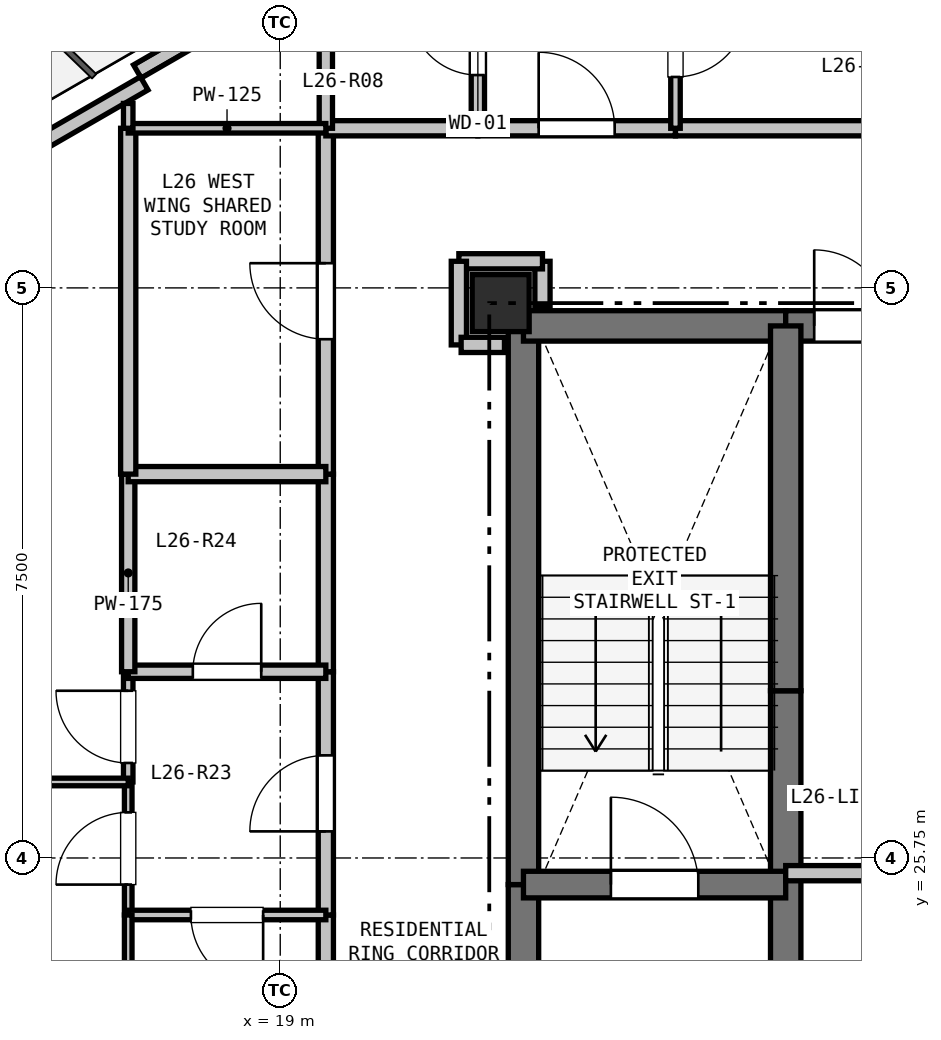
"""IFC4 building model, lengths in metres.
Left out: names, types, materials, properties, quantities, classifications, styles, units other than length and angle.
Written with IfcOpenShell. Run it as: python <this file> out.ifc"""

import sys

from ifc_helpers import new_model, si_unit, direction, frame, frame_2d, origin, origin_2d, place, context, subcontext, project, spatial, rectangle, extrude, element, fill, save


model = new_model("IFC4")
c1 = context("Model", 3, precision=1e-05, world=origin(), true_north=direction((0.0, 1.0)))
c2 = subcontext(c1, "Body", "Model", "MODEL_VIEW")
j1 = project(units=[si_unit("LENGTHUNIT", "METRE"), si_unit("PLANEANGLEUNIT", "RADIAN")], contexts=[c1])
p1 = place(None, origin())
s1 = spatial("IfcSite", under=j1, at=p1, CompositionType="ELEMENT")
p2 = place(p1, origin())
s2 = spatial("IfcBuilding", under=s1, at=p2, CompositionType="ELEMENT")
p3 = place(p2, frame((0.0, 0.0, 96.6)))
s3 = spatial("IfcBuildingStorey", under=s2, at=p3, CompositionType="ELEMENT", Elevation=96.6)
p4 = place(p3, frame((21.9, 33.05, 0.0), z_axis=(0.0, 0.0, 1.0), x_axis=(1.0, 0.0, 0.0)))
e1 = element("IfcColumn", 1, at=p4, inside=s3, PredefinedType="COLUMN", context=c2, shape_type="SweptSolid", body=[
    extrude(rectangle(XDim=0.75, YDim=0.75, at=origin_2d()), origin(), (0.0, 0.0, 1.0), 3.3),
])
p5 = place(p3, frame((17.12, 36.097, 0.0), z_axis=(0.0, 0.0, 1.0), x_axis=(0.866027010039, 0.499997217876, 0.0)))
e2 = element("IfcWall", 2, at=p5, inside=s3, PredefinedType="PARAPET", context=c2, shape_type="SweptSolid", body=[
    extrude(rectangle(XDim=11.229, YDim=0.2, at=frame_2d((5.615, 0.0))), origin(), (0.0, 0.0, 1.0), 0.2),
])
p6 = place(p3, frame((15.738, 35.091, 0.0), z_axis=(0.0, 0.0, 1.0), x_axis=(0.866025371046, 0.500000056704, 0.0)))
e3 = element("IfcWall", 3, at=p6, inside=s3, PredefinedType="PARAPET", context=c2, shape_type="SweptSolid", body=[
    extrude(rectangle(XDim=1.7, YDim=0.2, at=frame_2d((0.85, 0.0))), origin(), (0.0, 0.0, 1.0), 2.67),
])
p7 = place(p3, frame((22.2, 20.75, 0.0), z_axis=(0.0, 0.0, 1.0), x_axis=(0.0, 1.0, 0.0)))
e4 = element("IfcWall", 4, at=p7, inside=s3, PredefinedType="SHEAR", context=c2, shape_type="SweptSolid", body=[
    extrude(rectangle(XDim=4.65, YDim=0.4, at=frame_2d((2.325, 0.0))), origin(), (0.0, 0.0, 1.0), 3.05),
])
p8 = place(p3, frame((22.2, 25.4, 0.0), z_axis=(0.0, 0.0, 1.0), x_axis=(0.0, 1.0, 0.0)))
e5 = element("IfcWall", 5, at=p8, inside=s3, PredefinedType="SHEAR", context=c2, shape_type="SweptSolid", body=[
    extrude(rectangle(XDim=7.35, YDim=0.4, at=frame_2d((3.675, 0.0))), origin(), (0.0, 0.0, 1.0), 3.05),
])
p9 = place(p3, frame((22.2, 32.75, 0.0), z_axis=(0.0, 0.0, 1.0), x_axis=(1.0, 0.0, 0.0)))
e6 = element("IfcWall", 6, at=p9, inside=s3, PredefinedType="SHEAR", context=c2, shape_type="SweptSolid", body=[
    extrude(rectangle(XDim=3.45, YDim=0.4, at=frame_2d((1.725, 0.0))), origin(), (0.0, 0.0, 1.0), 3.05),
])
p10 = place(p3, frame((25.65, 32.75, 0.0), z_axis=(0.0, 0.0, 1.0), x_axis=(1.0, 0.0, 0.0)))
e7 = element("IfcWall", 7, at=p10, inside=s3, PredefinedType="SHEAR", context=c2, shape_type="SweptSolid", body=[
    extrude(rectangle(XDim=1.75, YDim=0.4, at=frame_2d((0.875, 0.0))), origin(), (0.0, 0.0, 1.0), 3.05),
])
p11 = place(p10, frame((0.375, 0.0, 0.0)))
e8 = element("IfcOpeningElement", 8, at=p11, cuts=e7, PredefinedType="OPENING", context=c2, shape_type="SweptSolid", body=[
    extrude(rectangle(XDim=1.0, YDim=2.15, at=frame_2d((0.5, 1.075))), frame((0.0, 0.21, 0.0), z_axis=(0.0, -1.0, 0.0), x_axis=(1.0, 0.0, 0.0)), (0.0, 0.0, 1.0), 0.42),
])
p12 = place(p3, frame((25.65, 22.75, 0.0), z_axis=(0.0, 0.0, 1.0), x_axis=(0.0, 1.0, 0.0)))
e9 = element("IfcWall", 9, at=p12, inside=s3, PredefinedType="SHEAR", context=c2, shape_type="SweptSolid", body=[
    extrude(rectangle(XDim=2.8, YDim=0.4, at=frame_2d((1.4, 0.0))), origin(), (0.0, 0.0, 1.0), 3.05),
])
p13 = place(p3, frame((25.65, 25.55, 0.0), z_axis=(0.0, 0.0, 1.0), x_axis=(0.0, 1.0, 0.0)))
e10 = element("IfcWall", 10, at=p13, inside=s3, PredefinedType="SHEAR", context=c2, shape_type="SweptSolid", body=[
    extrude(rectangle(XDim=2.4, YDim=0.4, at=frame_2d((1.2, 0.0))), origin(), (0.0, 0.0, 1.0), 3.05),
])
p14 = place(p3, frame((25.65, 27.95, 0.0), z_axis=(0.0, 0.0, 1.0), x_axis=(0.0, 1.0, 0.0)))
e11 = element("IfcWall", 11, at=p14, inside=s3, PredefinedType="SHEAR", context=c2, shape_type="SweptSolid", body=[
    extrude(rectangle(XDim=4.8, YDim=0.4, at=frame_2d((2.4, 0.0))), origin(), (0.0, 0.0, 1.0), 3.05),
])
p15 = place(p3, frame((22.2, 25.4, 0.0), z_axis=(0.0, 0.0, 1.0), x_axis=(1.0, 0.0, 0.0)))
e12 = element("IfcWall", 12, at=p15, inside=s3, PredefinedType="SHEAR", context=c2, shape_type="SweptSolid", body=[
    extrude(rectangle(XDim=3.45, YDim=0.35, at=frame_2d((1.725, 0.0))), origin(), (0.0, 0.0, 1.0), 3.05),
])
p16 = place(p15, frame((1.15, 0.0, 0.0)))
e13 = element("IfcOpeningElement", 13, at=p16, cuts=e12, PredefinedType="OPENING", context=c2, shape_type="SweptSolid", body=[
    extrude(rectangle(XDim=1.15, YDim=2.15, at=frame_2d((0.575, 1.075))), frame((0.0, 0.185, 0.0), z_axis=(0.0, -1.0, 0.0), x_axis=(1.0, 0.0, 0.0)), (0.0, 0.0, 1.0), 0.37),
])
p17 = place(p3, frame((25.65, 25.55, 0.0), z_axis=(0.0, 0.0, 1.0), x_axis=(1.0, 0.0, 0.0)))
e14 = element("IfcWall", 14, at=p17, inside=s3, PredefinedType="PARTITIONING", context=c2, shape_type="SweptSolid", body=[
    extrude(rectangle(XDim=4.95, YDim=0.2, at=frame_2d((2.475, 0.0))), origin(), (0.0, 0.0, 1.0), 3.05),
])
p18 = place(p3, frame((19.6, 21.8, 0.0), z_axis=(0.0, 0.0, 1.0), x_axis=(0.0, 1.0, 0.0)))
e15 = element("IfcWall", 15, at=p18, inside=s3, PredefinedType="PARTITIONING", context=c2, shape_type="SweptSolid", body=[
    extrude(rectangle(XDim=3.2, YDim=0.2, at=frame_2d((1.6, 0.0))), origin(), (0.0, 0.0, 1.0), 3.05),
])
p19 = place(p3, frame((19.6, 25.0, 0.0), z_axis=(0.0, 0.0, 1.0), x_axis=(0.0, 1.0, 0.0)))
e16 = element("IfcWall", 16, at=p19, inside=s3, PredefinedType="PARTITIONING", context=c2, shape_type="SweptSolid", body=[
    extrude(rectangle(XDim=3.2, YDim=0.2, at=frame_2d((1.6, 0.0))), origin(), (0.0, 0.0, 1.0), 3.05),
])
p20 = place(p19, frame((1.1, 0.0, 0.0)))
e17 = element("IfcOpeningElement", 17, at=p20, cuts=e16, PredefinedType="OPENING", context=c2, shape_type="SweptSolid", body=[
    extrude(rectangle(XDim=1.0, YDim=2.15, at=frame_2d((0.5, 1.075))), frame((0.0, 0.11, 0.0), z_axis=(0.0, -1.0, 0.0), x_axis=(1.0, 0.0, 0.0)), (0.0, 0.0, 1.0), 0.22),
])
p21 = place(p3, frame((19.6, 28.2, 0.0), z_axis=(0.0, 0.0, 1.0), x_axis=(0.0, 1.0, 0.0)))
e18 = element("IfcWall", 18, at=p21, inside=s3, PredefinedType="PARTITIONING", context=c2, shape_type="SweptSolid", body=[
    extrude(rectangle(XDim=2.6, YDim=0.2, at=frame_2d((1.3, 0.0))), origin(), (0.0, 0.0, 1.0), 3.05),
])
p22 = place(p3, frame((19.6, 30.8, 0.0), z_axis=(0.0, 0.0, 1.0), x_axis=(0.0, 1.0, 0.0)))
e19 = element("IfcWall", 19, at=p22, inside=s3, PredefinedType="PARTITIONING", context=c2, shape_type="SweptSolid", body=[
    extrude(rectangle(XDim=4.55, YDim=0.2, at=frame_2d((2.275, 0.0))), origin(), (0.0, 0.0, 1.0), 2.423),
])
p23 = place(p22, frame((1.775, 0.0, 0.0)))
e20 = element("IfcOpeningElement", 20, at=p23, cuts=e19, PredefinedType="OPENING", context=c2, shape_type="SweptSolid", body=[
    extrude(rectangle(XDim=1.0, YDim=2.15, at=frame_2d((0.5, 1.075))), frame((0.0, 0.11, 0.0), z_axis=(0.0, -1.0, 0.0), x_axis=(1.0, 0.0, 0.0)), (0.0, 0.0, 1.0), 0.22),
])
p24 = place(p3, frame((19.6, 35.35, 0.0), z_axis=(0.0, 0.0, 1.0), x_axis=(1.0, 0.0, 0.0)))
e21 = element("IfcWall", 21, at=p24, inside=s3, PredefinedType="PARTITIONING", context=c2, shape_type="SweptSolid", body=[
    extrude(rectangle(XDim=2.0, YDim=0.2, at=frame_2d((1.0, 0.0))), origin(), (0.0, 0.0, 1.0), 3.05),
])
p25 = place(p3, frame((21.6, 35.35, 0.0), z_axis=(0.0, 0.0, 1.0), x_axis=(1.0, 0.0, 0.0)))
e22 = element("IfcWall", 22, at=p25, inside=s3, PredefinedType="PARTITIONING", context=c2, shape_type="SweptSolid", body=[
    extrude(rectangle(XDim=2.6, YDim=0.2, at=frame_2d((1.3, 0.0))), origin(), (0.0, 0.0, 1.0), 3.05),
])
p26 = place(p25, frame((0.8, 0.0, 0.0)))
e23 = element("IfcOpeningElement", 23, at=p26, cuts=e22, PredefinedType="OPENING", context=c2, shape_type="SweptSolid", body=[
    extrude(rectangle(XDim=1.0, YDim=2.15, at=frame_2d((0.5, 1.075))), frame((0.0, 0.11, 0.0), z_axis=(0.0, -1.0, 0.0), x_axis=(1.0, 0.0, 0.0)), (0.0, 0.0, 1.0), 0.22),
])
p27 = place(p3, frame((24.2, 35.35, 0.0), z_axis=(0.0, 0.0, 1.0), x_axis=(1.0, 0.0, 0.0)))
e24 = element("IfcWall", 24, at=p27, inside=s3, PredefinedType="PARTITIONING", context=c2, shape_type="SweptSolid", body=[
    extrude(rectangle(XDim=3.2, YDim=0.2, at=frame_2d((1.6, 0.0))), origin(), (0.0, 0.0, 1.0), 3.05),
])
p28 = place(p3, frame((22.45, 33.0, 0.0), z_axis=(0.0, 0.0, 1.0), x_axis=(0.0, 1.0, 0.0)))
e25 = element("IfcWall", 25, at=p28, inside=s3, PredefinedType="PARTITIONING", context=c2, shape_type="SweptSolid", body=[
    extrude(rectangle(XDim=0.6, YDim=0.2, at=frame_2d((0.3, 0.0))), origin(), (0.0, 0.0, 1.0), 2.498),
])
p29 = place(p3, frame((22.45, 33.6, 0.0), z_axis=(0.0, 0.0, 1.0), x_axis=(-1.0, 0.0, 0.0)))
e26 = element("IfcWall", 26, at=p29, inside=s3, PredefinedType="PARTITIONING", context=c2, shape_type="SweptSolid", body=[
    extrude(rectangle(XDim=1.1, YDim=0.2, at=frame_2d((0.55, 0.0))), origin(), (0.0, 0.0, 1.0), 3.05),
])
p30 = place(p3, frame((21.35, 33.6, 0.0), z_axis=(0.0, 0.0, 1.0), x_axis=(0.0, -1.0, 0.0)))
e27 = element("IfcWall", 27, at=p30, inside=s3, PredefinedType="PARTITIONING", context=c2, shape_type="SweptSolid", body=[
    extrude(rectangle(XDim=1.1, YDim=0.2, at=frame_2d((0.55, 0.0))), origin(), (0.0, 0.0, 1.0), 2.423),
])
p31 = place(p3, frame((21.38, 32.5, 0.0), z_axis=(0.0, 0.0, 1.0), x_axis=(1.0, 0.0, 0.0)))
e28 = element("IfcWall", 28, at=p31, inside=s3, PredefinedType="PARTITIONING", context=c2, shape_type="SweptSolid", body=[
    extrude(rectangle(XDim=0.57, YDim=0.2, at=frame_2d((0.285, 0.0))), origin(), (0.0, 0.0, 1.0), 2.498),
])
p32 = place(p3, frame((24.2, 37.65, 0.0), z_axis=(0.0, 0.0, 1.0), x_axis=(0.0, -1.0, 0.0)))
e29 = element("IfcWall", 29, at=p32, inside=s3, PredefinedType="PARTITIONING", context=c2, shape_type="SweptSolid", body=[
    extrude(rectangle(XDim=2.3, YDim=0.125, at=frame_2d((1.15, 0.0))), origin(), (0.0, 0.0, 1.0), 3.05),
])
p33 = place(p32, frame((0.675, 0.0, 0.0)))
e30 = element("IfcOpeningElement", 30, at=p33, cuts=e29, PredefinedType="OPENING", context=c2, shape_type="SweptSolid", body=[
    extrude(rectangle(XDim=0.95, YDim=2.1, at=frame_2d((0.475, 1.05))), frame((0.0, 0.073, 0.0), z_axis=(0.0, -1.0, 0.0), x_axis=(1.0, 0.0, 0.0)), (0.0, 0.0, 1.0), 0.145),
])
p34 = place(p3, frame((21.6, 35.35, 0.0), z_axis=(0.0, 0.0, 1.0), x_axis=(0.0, 1.0, 0.0)))
e31 = element("IfcWall", 31, at=p34, inside=s3, PredefinedType="PLUMBINGWALL", context=c2, shape_type="SweptSolid", body=[
    extrude(rectangle(XDim=2.3, YDim=0.175, at=frame_2d((1.15, 0.0))), origin(), (0.0, 0.0, 1.0), 3.05),
])
p35 = place(p34, frame((0.7, 0.0, 0.0)))
e32 = element("IfcOpeningElement", 32, at=p35, cuts=e31, PredefinedType="OPENING", context=c2, shape_type="SweptSolid", body=[
    extrude(rectangle(XDim=0.9, YDim=2.1, at=frame_2d((0.45, 1.05))), frame((0.0, 0.097, 0.0), z_axis=(0.0, -1.0, 0.0), x_axis=(1.0, 0.0, 0.0)), (0.0, 0.0, 1.0), 0.195),
])
p36 = place(p3, frame((17.0, 25.0, 0.0), z_axis=(0.0, 0.0, 1.0), x_axis=(0.0, 1.0, 0.0)))
e33 = element("IfcWall", 33, at=p36, inside=s3, PredefinedType="PARTITIONING", context=c2, shape_type="SweptSolid", body=[
    extrude(rectangle(XDim=1.75, YDim=0.1, at=frame_2d((0.875, 0.0))), origin(), (0.0, 0.0, 1.0), 3.05),
])
p37 = place(p36, frame((0.4, 0.0, 0.0)))
e34 = element("IfcOpeningElement", 34, at=p37, cuts=e33, PredefinedType="OPENING", context=c2, shape_type="SweptSolid", body=[
    extrude(rectangle(XDim=0.95, YDim=2.1, at=frame_2d((0.475, 1.05))), frame((0.0, 0.06, 0.0), z_axis=(0.0, -1.0, 0.0), x_axis=(1.0, 0.0, 0.0)), (0.0, 0.0, 1.0), 0.12),
])
p38 = place(p3, frame((17.0, 26.75, 0.0), z_axis=(0.0, 0.0, 1.0), x_axis=(0.0, 1.0, 0.0)))
e35 = element("IfcWall", 35, at=p38, inside=s3, PredefinedType="PARTITIONING", context=c2, shape_type="SweptSolid", body=[
    extrude(rectangle(XDim=1.45, YDim=0.125, at=frame_2d((0.725, 0.0))), origin(), (0.0, 0.0, 1.0), 3.05),
])
p39 = place(p38, frame((0.25, 0.0, 0.0)))
e36 = element("IfcOpeningElement", 36, at=p39, cuts=e35, PredefinedType="OPENING", context=c2, shape_type="SweptSolid", body=[
    extrude(rectangle(XDim=0.95, YDim=2.1, at=frame_2d((0.475, 1.05))), frame((0.0, 0.073, 0.0), z_axis=(0.0, -1.0, 0.0), x_axis=(1.0, 0.0, 0.0)), (0.0, 0.0, 1.0), 0.145),
])
p40 = place(p3, frame((17.0, 28.2, 0.0), z_axis=(0.0, 0.0, 1.0), x_axis=(1.0, 0.0, 0.0)))
e37 = element("IfcWall", 37, at=p40, inside=s3, PredefinedType="PLUMBINGWALL", context=c2, shape_type="SweptSolid", body=[
    extrude(rectangle(XDim=2.6, YDim=0.175, at=frame_2d((1.3, 0.0))), origin(), (0.0, 0.0, 1.0), 3.05),
])
p41 = place(p40, frame((0.85, 0.0, 0.0)))
e38 = element("IfcOpeningElement", 38, at=p41, cuts=e37, PredefinedType="OPENING", context=c2, shape_type="SweptSolid", body=[
    extrude(rectangle(XDim=0.9, YDim=2.1, at=frame_2d((0.45, 1.05))), frame((0.0, 0.097, 0.0), z_axis=(0.0, -1.0, 0.0), x_axis=(1.0, 0.0, 0.0)), (0.0, 0.0, 1.0), 0.195),
])
p42 = place(p3, frame((19.6, 25.0, 0.0), z_axis=(0.0, 0.0, 1.0), x_axis=(-1.0, 0.0, 0.0)))
e39 = element("IfcWall", 39, at=p42, inside=s3, PredefinedType="PARTITIONING", context=c2, shape_type="SweptSolid", body=[
    extrude(rectangle(XDim=2.6, YDim=0.125, at=frame_2d((1.3, 0.0))), origin(), (0.0, 0.0, 1.0), 3.05),
])
p43 = place(p42, frame((0.825, 0.0, 0.0)))
e40 = element("IfcOpeningElement", 40, at=p43, cuts=e39, PredefinedType="OPENING", context=c2, shape_type="SweptSolid", body=[
    extrude(rectangle(XDim=0.95, YDim=2.1, at=frame_2d((0.475, 1.05))), frame((0.0, 0.073, 0.0), z_axis=(0.0, -1.0, 0.0), x_axis=(1.0, 0.0, 0.0)), (0.0, 0.0, 1.0), 0.145),
])
p44 = place(p3, frame((19.6, 35.35, 0.0), z_axis=(0.0, 0.0, 1.0), x_axis=(0.0, 1.0, 0.0)))
e41 = element("IfcWall", 41, at=p44, inside=s3, PredefinedType="PLUMBINGWALL", context=c2, shape_type="SweptSolid", body=[
    extrude(rectangle(XDim=2.137, YDim=0.175, at=frame_2d((1.068, 0.0))), origin(), (0.0, 0.0, 1.0), 2.365),
])
p45 = place(p3, frame((17.0, 28.2, 0.0), z_axis=(0.0, 0.0, 1.0), x_axis=(0.0, 1.0, 0.0)))
e42 = element("IfcWall", 42, at=p45, inside=s3, PredefinedType="PLUMBINGWALL", context=c2, shape_type="SweptSolid", body=[
    extrude(rectangle(XDim=2.6, YDim=0.175, at=frame_2d((1.3, 0.0))), origin(), (0.0, 0.0, 1.0), 3.05),
])
p46 = place(p3, frame((17.0, 30.8, 0.0), z_axis=(0.0, 0.0, 1.0), x_axis=(1.0, 0.0, 0.0)))
e43 = element("IfcWall", 43, at=p46, inside=s3, PredefinedType="PARTITIONING", context=c2, shape_type="SweptSolid", body=[
    extrude(rectangle(XDim=2.6, YDim=0.2, at=frame_2d((1.3, 0.0))), origin(), (0.0, 0.0, 1.0), 3.05),
])
p47 = place(p3, frame((17.0, 21.8, 0.0), z_axis=(0.0, 0.0, 1.0), x_axis=(0.0, 1.0, 0.0)))
e44 = element("IfcWall", 44, at=p47, inside=s3, PredefinedType="PARTITIONING", context=c2, shape_type="SweptSolid", body=[
    extrude(rectangle(XDim=3.2, YDim=0.1, at=frame_2d((1.6, 0.0))), origin(), (0.0, 0.0, 1.0), 2.423),
])
p48 = place(p47, frame((1.125, 0.0, 0.0)))
e45 = element("IfcOpeningElement", 45, at=p48, cuts=e44, PredefinedType="OPENING", context=c2, shape_type="SweptSolid", body=[
    extrude(rectangle(XDim=0.95, YDim=2.1, at=frame_2d((0.475, 1.05))), frame((0.0, 0.06, 0.0), z_axis=(0.0, -1.0, 0.0), x_axis=(1.0, 0.0, 0.0)), (0.0, 0.0, 1.0), 0.12),
])
p49 = place(p3, frame((17.0, 30.8, 0.0), z_axis=(0.0, 0.0, 1.0), x_axis=(0.0, 1.0, 0.0)))
e46 = element("IfcWall", 46, at=p49, inside=s3, PredefinedType="PARTITIONING", context=c2, shape_type="SweptSolid", body=[
    extrude(rectangle(XDim=4.55, YDim=0.2, at=frame_2d((2.275, 0.0))), origin(), (0.0, 0.0, 1.0), 2.365),
])
p50 = place(p3, frame((17.0, 35.35, 0.0), z_axis=(0.0, 0.0, 1.0), x_axis=(1.0, 0.0, 0.0)))
e47 = element("IfcWall", 47, at=p50, inside=s3, PredefinedType="PARTITIONING", context=c2, shape_type="SweptSolid", body=[
    extrude(rectangle(XDim=2.6, YDim=0.125, at=frame_2d((1.3, 0.0))), origin(), (0.0, 0.0, 1.0), 2.365),
])
p51 = place(p3, frame((17.0, 35.677, 0.0), z_axis=(0.0, 0.0, 1.0), x_axis=(0.0, -1.0, 0.0)))
e48 = element("IfcWall", 48, at=p51, inside=s3, PredefinedType="PARTITIONING", context=c2, shape_type="SweptSolid", body=[
    extrude(rectangle(XDim=0.326, YDim=0.125, at=frame_2d((0.163, 0.0))), origin(), (0.0, 0.0, 1.0), 2.365),
])
p52 = place(p3, frame((17.0, 26.75, 0.0), z_axis=(0.0, 0.0, 1.0), x_axis=(-1.0, 0.0, 0.0)))
e49 = element("IfcWall", 49, at=p52, inside=s3, PredefinedType="PARTITIONING", context=c2, shape_type="SweptSolid", body=[
    extrude(rectangle(XDim=5.91, YDim=0.1, at=frame_2d((2.955, 0.0))), origin(), (0.0, 0.0, 1.0), 3.05),
])
p53 = place(p52, frame((2.48, 0.0, 0.0)))
e50 = element("IfcOpeningElement", 50, at=p53, cuts=e49, PredefinedType="OPENING", context=c2, shape_type="SweptSolid", body=[
    extrude(rectangle(XDim=0.95, YDim=2.1, at=frame_2d((0.475, 1.05))), frame((0.0, 0.06, 0.0), z_axis=(0.0, -1.0, 0.0), x_axis=(1.0, 0.0, 0.0)), (0.0, 0.0, 1.0), 0.12),
])
p54 = place(p11, origin())
e51 = element("IfcDoor", 51, at=p54, inside=s3, OperationType="SINGLE_SWING_LEFT", PredefinedType="DOOR", context=c2, shape_type="SweptSolid", body=[
    extrude(rectangle(XDim=1.0, YDim=2.15, at=frame_2d((0.5, 1.075))), frame((0.0, 0.025, 0.0), z_axis=(0.0, -1.0, 0.0), x_axis=(1.0, 0.0, 0.0)), (0.0, 0.0, 1.0), 0.05),
])
fill(e8, e51)
p55 = place(p16, origin())
e52 = element("IfcDoor", 52, at=p55, inside=s3, OperationType="SINGLE_SWING_LEFT", PredefinedType="DOOR", context=c2, shape_type="SweptSolid", body=[
    extrude(rectangle(XDim=1.15, YDim=2.15, at=frame_2d((0.575, 1.075))), frame((0.0, 0.025, 0.0), z_axis=(0.0, -1.0, 0.0), x_axis=(1.0, 0.0, 0.0)), (0.0, 0.0, 1.0), 0.05),
])
fill(e13, e52)
p56 = place(p26, origin())
e53 = element("IfcDoor", 53, at=p56, inside=s3, OperationType="SINGLE_SWING_LEFT", PredefinedType="DOOR", context=c2, shape_type="SweptSolid", body=[
    extrude(rectangle(XDim=1.0, YDim=2.15, at=frame_2d((0.5, 1.075))), frame((0.0, 0.025, 0.0), z_axis=(0.0, -1.0, 0.0), x_axis=(1.0, 0.0, 0.0)), (0.0, 0.0, 1.0), 0.05),
])
fill(e23, e53)
p57 = place(p20, origin())
e54 = element("IfcDoor", 54, at=p57, inside=s3, OperationType="SINGLE_SWING_LEFT", PredefinedType="DOOR", context=c2, shape_type="SweptSolid", body=[
    extrude(rectangle(XDim=1.0, YDim=2.15, at=frame_2d((0.5, 1.075))), frame((0.0, 0.025, 0.0), z_axis=(0.0, -1.0, 0.0), x_axis=(1.0, 0.0, 0.0)), (0.0, 0.0, 1.0), 0.05),
])
fill(e17, e54)
p58 = place(p23, origin())
e55 = element("IfcDoor", 55, at=p58, inside=s3, OperationType="SINGLE_SWING_RIGHT", PredefinedType="DOOR", context=c2, shape_type="SweptSolid", body=[
    extrude(rectangle(XDim=1.0, YDim=2.15, at=frame_2d((0.5, 1.075))), frame((0.0, 0.025, 0.0), z_axis=(0.0, -1.0, 0.0), x_axis=(1.0, 0.0, 0.0)), (0.0, 0.0, 1.0), 0.05),
])
fill(e20, e55)
p59 = place(p35, origin())
e56 = element("IfcDoor", 56, at=p59, inside=s3, OperationType="SINGLE_SWING_RIGHT", PredefinedType="DOOR", context=c2, shape_type="SweptSolid", body=[
    extrude(rectangle(XDim=0.9, YDim=2.1, at=frame_2d((0.45, 1.05))), frame((0.0, 0.025, 0.0), z_axis=(0.0, -1.0, 0.0), x_axis=(1.0, 0.0, 0.0)), (0.0, 0.0, 1.0), 0.05),
])
fill(e32, e56)
p60 = place(p33, origin())
e57 = element("IfcDoor", 57, at=p60, inside=s3, OperationType="SINGLE_SWING_LEFT", PredefinedType="DOOR", context=c2, shape_type="SweptSolid", body=[
    extrude(rectangle(XDim=0.95, YDim=2.1, at=frame_2d((0.475, 1.05))), frame((0.0, 0.025, 0.0), z_axis=(0.0, -1.0, 0.0), x_axis=(1.0, 0.0, 0.0)), (0.0, 0.0, 1.0), 0.05),
])
fill(e30, e57)
p61 = place(p41, origin())
e58 = element("IfcDoor", 58, at=p61, inside=s3, OperationType="SINGLE_SWING_RIGHT", PredefinedType="DOOR", context=c2, shape_type="SweptSolid", body=[
    extrude(rectangle(XDim=0.9, YDim=2.1, at=frame_2d((0.45, 1.05))), frame((0.0, 0.025, 0.0), z_axis=(0.0, -1.0, 0.0), x_axis=(1.0, 0.0, 0.0)), (0.0, 0.0, 1.0), 0.05),
])
fill(e38, e58)
p62 = place(p43, origin())
e59 = element("IfcDoor", 59, at=p62, inside=s3, OperationType="SINGLE_SWING_LEFT", PredefinedType="DOOR", context=c2, shape_type="SweptSolid", body=[
    extrude(rectangle(XDim=0.95, YDim=2.1, at=frame_2d((0.475, 1.05))), frame((0.0, 0.025, 0.0), z_axis=(0.0, -1.0, 0.0), x_axis=(1.0, 0.0, 0.0)), (0.0, 0.0, 1.0), 0.05),
])
fill(e40, e59)
p63 = place(p39, origin())
e60 = element("IfcDoor", 60, at=p63, inside=s3, OperationType="SINGLE_SWING_RIGHT", PredefinedType="DOOR", context=c2, shape_type="SweptSolid", body=[
    extrude(rectangle(XDim=0.95, YDim=2.1, at=frame_2d((0.475, 1.05))), frame((0.0, 0.025, 0.0), z_axis=(0.0, -1.0, 0.0), x_axis=(1.0, 0.0, 0.0)), (0.0, 0.0, 1.0), 0.05),
])
fill(e36, e60)
p64 = place(p37, origin())
e61 = element("IfcDoor", 61, at=p64, inside=s3, OperationType="SINGLE_SWING_LEFT", PredefinedType="DOOR", context=c2, shape_type="SweptSolid", body=[
    extrude(rectangle(XDim=0.95, YDim=2.1, at=frame_2d((0.475, 1.05))), frame((0.0, 0.025, 0.0), z_axis=(0.0, -1.0, 0.0), x_axis=(1.0, 0.0, 0.0)), (0.0, 0.0, 1.0), 0.05),
])
fill(e34, e61)
save(model, sys.argv[1])
